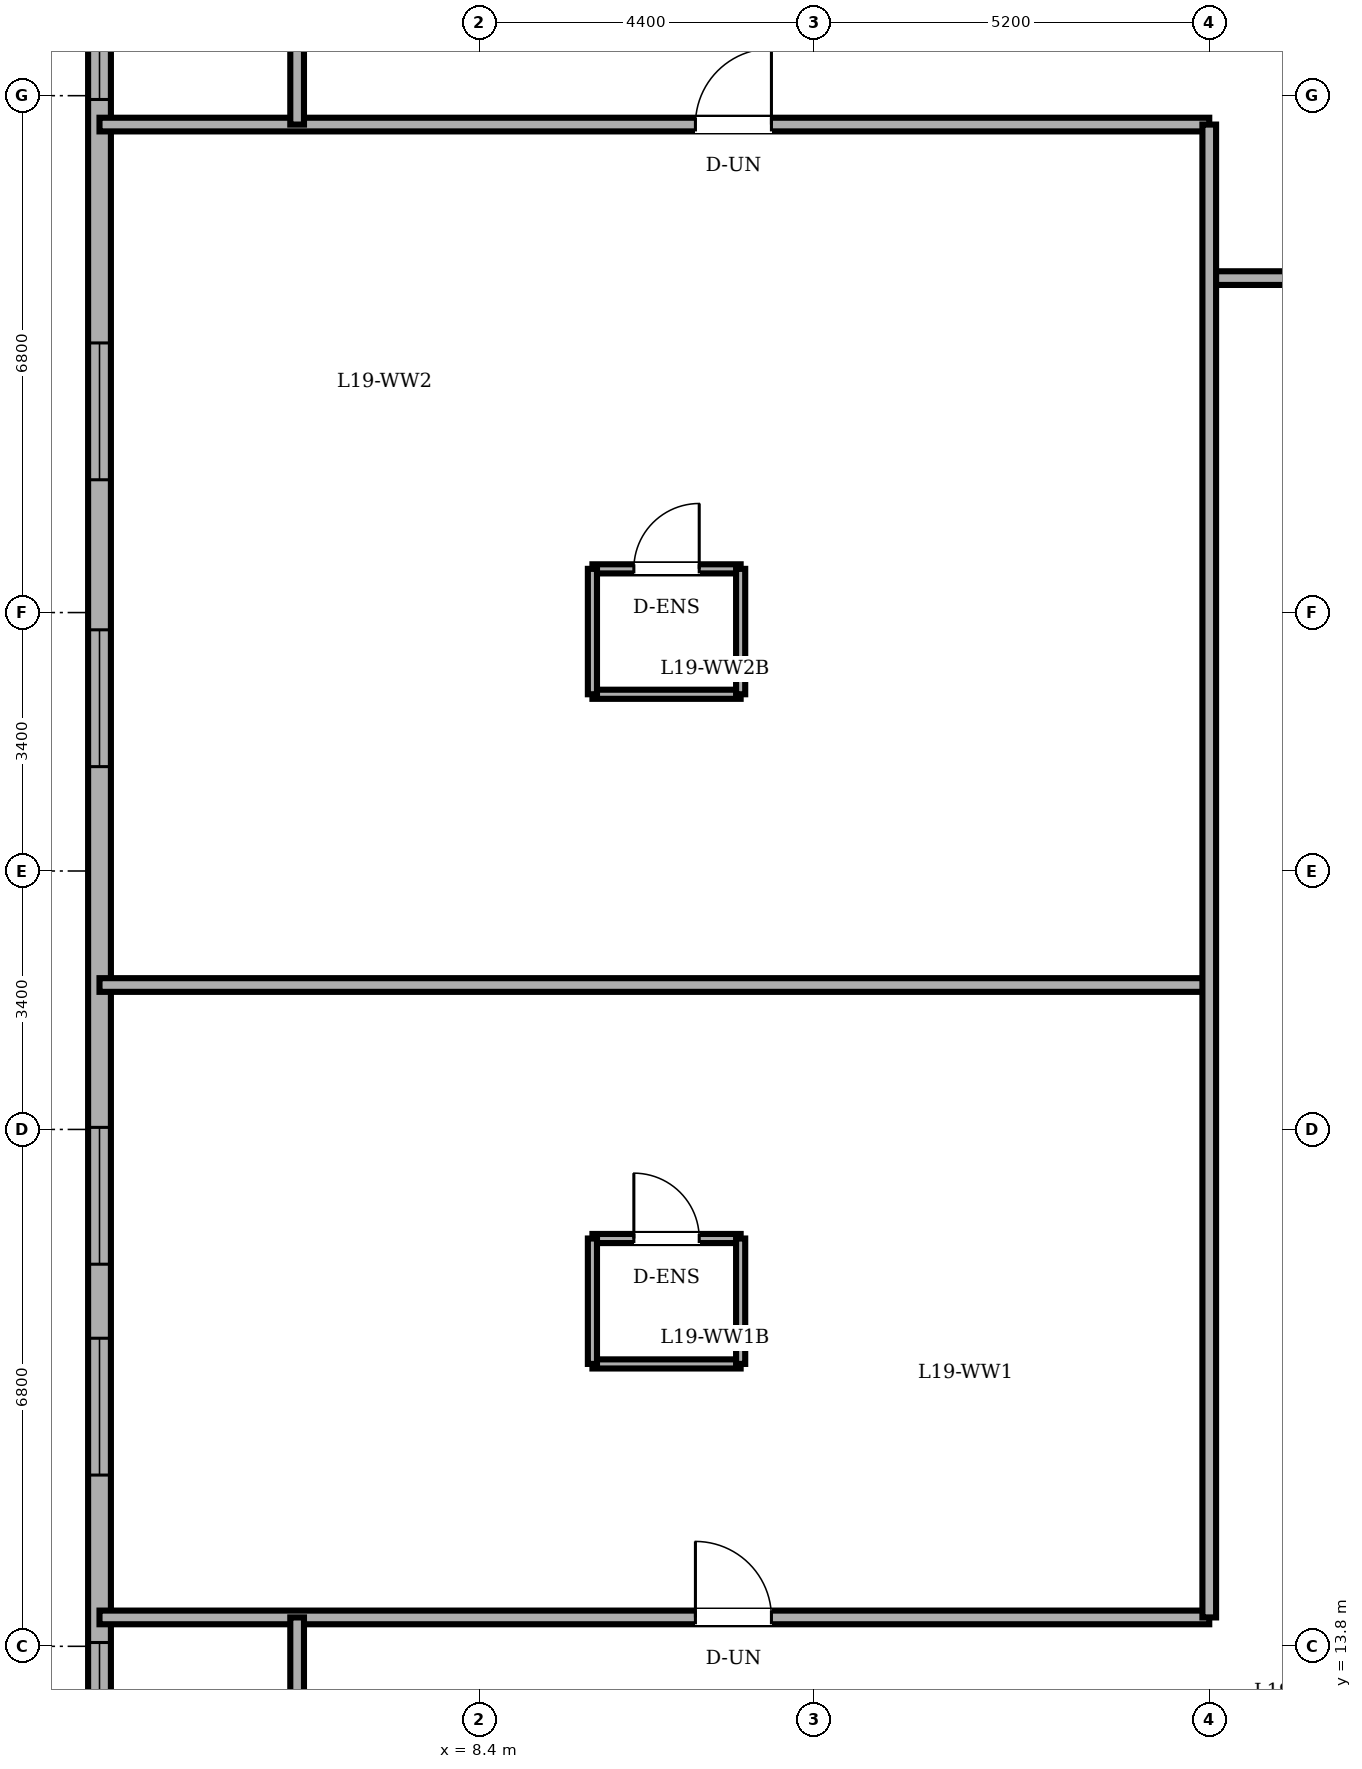
"""IFC4 building model, lengths in metres.
Left out: names, types, materials, properties, quantities, classifications, styles, units other than length and angle.
Written with IfcOpenShell. Run it as: python <this file> out.ifc"""

import sys

from ifc_helpers import new_model, si_unit, direction, frame, frame_2d, origin, place, context, subcontext, project, spatial, rectangle, extrude, element, fill, save


model = new_model("IFC4")
c1 = context("Model", 3, precision=1e-05, world=origin(), true_north=direction((0.0, 1.0)))
c2 = subcontext(c1, "Body", "Model", "MODEL_VIEW")
j1 = project(units=[si_unit("LENGTHUNIT", "METRE"), si_unit("PLANEANGLEUNIT", "RADIAN")], contexts=[c1])
p1 = place(None, origin())
s1 = spatial("IfcSite", under=j1, at=p1, CompositionType="ELEMENT")
p2 = place(p1, origin())
s2 = spatial("IfcBuilding", under=s1, at=p2, CompositionType="ELEMENT")
p3 = place(p2, frame((0.0, 0.0, 72.0)))
s3 = spatial("IfcBuildingStorey", under=s2, at=p3, CompositionType="ELEMENT", Elevation=72.0)
p4 = place(p3, frame((3.4, 40.2, 0.0), z_axis=(0.0, 0.0, 1.0), x_axis=(0.0, -1.0, 0.0)))
e1 = element("IfcWall", 1, at=p4, inside=s3, PredefinedType="SOLIDWALL", context=c2, shape_type="SweptSolid", body=[
    extrude(rectangle(XDim=32.4, YDim=0.3, at=frame_2d((16.2, 0.0))), origin(), (0.0, 0.0, 1.0), 3.36),
])
p5 = place(p4, frame((1.235, 0.0, 0.85)))
e2 = element("IfcOpeningElement", 2, at=p5, cuts=e1, PredefinedType="OPENING", context=c2, shape_type="SweptSolid", body=[
    extrude(rectangle(XDim=1.8, YDim=1.55, at=frame_2d((0.9, 0.775))), frame((0.0, 0.16, 0.0), z_axis=(0.0, -1.0, 0.0), x_axis=(1.0, 0.0, 0.0)), (0.0, 0.0, 1.0), 0.32),
])
p6 = place(p4, frame((4.25, 0.0, 0.85)))
e3 = element("IfcOpeningElement", 3, at=p6, cuts=e1, PredefinedType="OPENING", context=c2, shape_type="SweptSolid", body=[
    extrude(rectangle(XDim=1.8, YDim=1.55, at=frame_2d((0.9, 0.775))), frame((0.0, 0.16, 0.0), z_axis=(0.0, -1.0, 0.0), x_axis=(1.0, 0.0, 0.0)), (0.0, 0.0, 1.0), 0.32),
])
p7 = place(p4, frame((9.253, 0.0, 0.85)))
e4 = element("IfcOpeningElement", 4, at=p7, cuts=e1, PredefinedType="OPENING", context=c2, shape_type="SweptSolid", body=[
    extrude(rectangle(XDim=1.8, YDim=1.55, at=frame_2d((0.9, 0.775))), frame((0.0, 0.16, 0.0), z_axis=(0.0, -1.0, 0.0), x_axis=(1.0, 0.0, 0.0)), (0.0, 0.0, 1.0), 0.32),
])
p8 = place(p4, frame((13.027, 0.0, 0.85)))
e5 = element("IfcOpeningElement", 5, at=p8, cuts=e1, PredefinedType="OPENING", context=c2, shape_type="SweptSolid", body=[
    extrude(rectangle(XDim=1.8, YDim=1.55, at=frame_2d((0.9, 0.775))), frame((0.0, 0.16, 0.0), z_axis=(0.0, -1.0, 0.0), x_axis=(1.0, 0.0, 0.0)), (0.0, 0.0, 1.0), 0.32),
])
p9 = place(p4, frame((19.573, 0.0, 0.85)))
e6 = element("IfcOpeningElement", 6, at=p9, cuts=e1, PredefinedType="OPENING", context=c2, shape_type="SweptSolid", body=[
    extrude(rectangle(XDim=1.8, YDim=1.55, at=frame_2d((0.9, 0.775))), frame((0.0, 0.16, 0.0), z_axis=(0.0, -1.0, 0.0), x_axis=(1.0, 0.0, 0.0)), (0.0, 0.0, 1.0), 0.32),
])
p10 = place(p4, frame((22.347, 0.0, 0.85)))
e7 = element("IfcOpeningElement", 7, at=p10, cuts=e1, PredefinedType="OPENING", context=c2, shape_type="SweptSolid", body=[
    extrude(rectangle(XDim=1.8, YDim=1.55, at=frame_2d((0.9, 0.775))), frame((0.0, 0.16, 0.0), z_axis=(0.0, -1.0, 0.0), x_axis=(1.0, 0.0, 0.0)), (0.0, 0.0, 1.0), 0.32),
])
p11 = place(p4, frame((26.35, 0.0, 0.85)))
e8 = element("IfcOpeningElement", 8, at=p11, cuts=e1, PredefinedType="OPENING", context=c2, shape_type="SweptSolid", body=[
    extrude(rectangle(XDim=1.8, YDim=1.55, at=frame_2d((0.9, 0.775))), frame((0.0, 0.16, 0.0), z_axis=(0.0, -1.0, 0.0), x_axis=(1.0, 0.0, 0.0)), (0.0, 0.0, 1.0), 0.32),
])
p12 = place(p4, frame((29.365, 0.0, 0.85)))
e9 = element("IfcOpeningElement", 9, at=p12, cuts=e1, PredefinedType="OPENING", context=c2, shape_type="SweptSolid", body=[
    extrude(rectangle(XDim=1.8, YDim=1.55, at=frame_2d((0.9, 0.775))), frame((0.0, 0.16, 0.0), z_axis=(0.0, -1.0, 0.0), x_axis=(1.0, 0.0, 0.0)), (0.0, 0.0, 1.0), 0.32),
])
p13 = place(p3, frame((9.885, 19.165, 0.0), z_axis=(0.0, 0.0, 1.0), x_axis=(1.0, 0.0, 0.0)))
e10 = element("IfcWall", 10, at=p13, inside=s3, PredefinedType="PARTITIONING", context=c2, shape_type="SweptSolid", body=[
    extrude(rectangle(XDim=1.95, YDim=0.12, at=frame_2d((0.975, 0.0))), origin(), (0.0, 0.0, 1.0), 3.36),
])
p14 = place(p13, frame((0.545, 0.0, 0.0)))
e11 = element("IfcOpeningElement", 11, at=p14, cuts=e10, PredefinedType="OPENING", context=c2, shape_type="SweptSolid", body=[
    extrude(rectangle(XDim=0.86, YDim=2.1, at=frame_2d((0.43, 1.05))), frame((0.0, 0.07, 0.0), z_axis=(0.0, -1.0, 0.0), x_axis=(1.0, 0.0, 0.0)), (0.0, 0.0, 1.0), 0.14),
])
p15 = place(p3, frame((11.835, 17.515, 0.0), z_axis=(0.0, 0.0, 1.0), x_axis=(-1.0, 0.0, 0.0)))
e12 = element("IfcWall", 12, at=p15, inside=s3, PredefinedType="PARTITIONING", context=c2, shape_type="SweptSolid", body=[
    extrude(rectangle(XDim=1.95, YDim=0.12, at=frame_2d((0.975, 0.0))), origin(), (0.0, 0.0, 1.0), 3.36),
])
for number, where, z_axis, x_axis in (
    (13, (9.885, 19.165, 0.0), (0.0, 0.0, 1.0), (0.0, -1.0, 0.0)),
    (14, (11.835, 17.515, 0.0), (0.0, 0.0, 1.0), (0.0, 1.0, 0.0)),
):
    element("IfcWall", number, at=place(p3, frame(where, z_axis=z_axis, x_axis=x_axis)), inside=s3, PredefinedType="PARTITIONING", context=c2, shape_type="SweptSolid", body=[
        extrude(rectangle(XDim=1.65, YDim=0.12, at=frame_2d((0.825, 0.0))), origin(), (0.0, 0.0, 1.0), 3.36),
    ])
p16 = place(p3, frame((9.885, 27.975, 0.0), z_axis=(0.0, 0.0, 1.0), x_axis=(1.0, 0.0, 0.0)))
e15 = element("IfcWall", 15, at=p16, inside=s3, PredefinedType="PARTITIONING", context=c2, shape_type="SweptSolid", body=[
    extrude(rectangle(XDim=1.95, YDim=0.12, at=frame_2d((0.975, 0.0))), origin(), (0.0, 0.0, 1.0), 3.36),
])
p17 = place(p16, frame((0.545, 0.0, 0.0)))
e16 = element("IfcOpeningElement", 16, at=p17, cuts=e15, PredefinedType="OPENING", context=c2, shape_type="SweptSolid", body=[
    extrude(rectangle(XDim=0.86, YDim=2.1, at=frame_2d((0.43, 1.05))), frame((0.0, 0.07, 0.0), z_axis=(0.0, -1.0, 0.0), x_axis=(1.0, 0.0, 0.0)), (0.0, 0.0, 1.0), 0.14),
])
p18 = place(p3, frame((11.835, 26.325, 0.0), z_axis=(0.0, 0.0, 1.0), x_axis=(-1.0, 0.0, 0.0)))
e17 = element("IfcWall", 17, at=p18, inside=s3, PredefinedType="PARTITIONING", context=c2, shape_type="SweptSolid", body=[
    extrude(rectangle(XDim=1.95, YDim=0.12, at=frame_2d((0.975, 0.0))), origin(), (0.0, 0.0, 1.0), 3.36),
])
for number, where, z_axis, x_axis in (
    (18, (9.885, 27.975, 0.0), (0.0, 0.0, 1.0), (0.0, -1.0, 0.0)),
    (19, (11.835, 26.325, 0.0), (0.0, 0.0, 1.0), (0.0, 1.0, 0.0)),
):
    element("IfcWall", number, at=place(p3, frame(where, z_axis=z_axis, x_axis=x_axis)), inside=s3, PredefinedType="PARTITIONING", context=c2, shape_type="SweptSolid", body=[
        extrude(rectangle(XDim=1.65, YDim=0.12, at=frame_2d((0.825, 0.0))), origin(), (0.0, 0.0, 1.0), 3.36),
    ])
p19 = place(p3, frame((3.4, 14.18, 0.0), z_axis=(0.0, 0.0, 1.0), x_axis=(1.0, 0.0, 0.0)))
e20 = element("IfcWall", 20, at=p19, inside=s3, PredefinedType="PARTITIONING", context=c2, shape_type="SweptSolid", body=[
    extrude(rectangle(XDim=14.6, YDim=0.18, at=frame_2d((7.3, 0.0))), origin(), (0.0, 0.0, 1.0), 3.36),
])
p20 = place(p19, frame((7.84, 0.0, 0.0)))
e21 = element("IfcOpeningElement", 21, at=p20, cuts=e20, PredefinedType="OPENING", context=c2, shape_type="SweptSolid", body=[
    extrude(rectangle(XDim=1.0, YDim=2.15, at=frame_2d((0.5, 1.075))), frame((0.0, 0.1, 0.0), z_axis=(0.0, -1.0, 0.0), x_axis=(1.0, 0.0, 0.0)), (0.0, 0.0, 1.0), 0.2),
])
p21 = place(p3, frame((3.4, 22.5, 0.0), z_axis=(0.0, 0.0, 1.0), x_axis=(1.0, 0.0, 0.0)))
e22 = element("IfcWall", 22, at=p21, inside=s3, PredefinedType="PARTITIONING", context=c2, shape_type="SweptSolid", body=[
    extrude(rectangle(XDim=14.6, YDim=0.18, at=frame_2d((7.3, 0.0))), origin(), (0.0, 0.0, 1.0), 3.36),
])
p22 = place(p3, frame((18.0, 31.8, 0.0), z_axis=(0.0, 0.0, 1.0), x_axis=(1.0, 0.0, 0.0)))
e23 = element("IfcWall", 23, at=p22, inside=s3, PredefinedType="PARTITIONING", context=c2, shape_type="SweptSolid", body=[
    extrude(rectangle(XDim=2.35, YDim=0.18, at=frame_2d((1.175, 0.0))), origin(), (0.0, 0.0, 1.0), 3.36),
])
p23 = place(p3, frame((3.4, 33.82, 0.0), z_axis=(0.0, 0.0, 1.0), x_axis=(1.0, 0.0, 0.0)))
e24 = element("IfcWall", 24, at=p23, inside=s3, PredefinedType="PARTITIONING", context=c2, shape_type="SweptSolid", body=[
    extrude(rectangle(XDim=14.6, YDim=0.18, at=frame_2d((7.3, 0.0))), origin(), (0.0, 0.0, 1.0), 3.36),
])
p24 = place(p23, frame((7.84, 0.0, 0.0)))
e25 = element("IfcOpeningElement", 25, at=p24, cuts=e24, PredefinedType="OPENING", context=c2, shape_type="SweptSolid", body=[
    extrude(rectangle(XDim=1.0, YDim=2.15, at=frame_2d((0.5, 1.075))), frame((0.0, 0.1, 0.0), z_axis=(0.0, -1.0, 0.0), x_axis=(1.0, 0.0, 0.0)), (0.0, 0.0, 1.0), 0.2),
])
for number, where, z_axis, x_axis in (
    (26, (6.0, 11.72, 0.0), (0.0, 0.0, 1.0), (0.0, 1.0, 0.0)),
    (27, (6.0, 33.82, 0.0), (0.0, 0.0, 1.0), (0.0, 1.0, 0.0)),
):
    element("IfcWall", number, at=place(p3, frame(where, z_axis=z_axis, x_axis=x_axis)), inside=s3, PredefinedType="PARTITIONING", context=c2, shape_type="SweptSolid", body=[
        extrude(rectangle(XDim=2.46, YDim=0.18, at=frame_2d((1.23, 0.0))), origin(), (0.0, 0.0, 1.0), 3.36),
    ])
p25 = place(p3, frame((18.0, 14.18, 0.0), z_axis=(0.0, 0.0, 1.0), x_axis=(0.0, 1.0, 0.0)))
e28 = element("IfcWall", 28, at=p25, inside=s3, PredefinedType="PARTITIONING", context=c2, shape_type="SweptSolid", body=[
    extrude(rectangle(XDim=19.64, YDim=0.18, at=frame_2d((9.82, 0.0))), origin(), (0.0, 0.0, 1.0), 3.36),
])
p26 = place(p6, origin())
e29 = element("IfcWindow", 29, at=p26, inside=s3, PartitioningType="DOUBLE_PANEL_VERTICAL", PredefinedType="WINDOW", context=c2, shape_type="SweptSolid", body=[
    extrude(rectangle(XDim=1.8, YDim=1.55, at=frame_2d((0.9, 0.775))), frame((0.0, 0.03, 0.0), z_axis=(0.0, -1.0, 0.0), x_axis=(1.0, 0.0, 0.0)), (0.0, 0.0, 1.0), 0.06),
])
fill(e3, e29)
p27 = place(p7, origin())
e30 = element("IfcWindow", 30, at=p27, inside=s3, PartitioningType="DOUBLE_PANEL_VERTICAL", PredefinedType="WINDOW", context=c2, shape_type="SweptSolid", body=[
    extrude(rectangle(XDim=1.8, YDim=1.55, at=frame_2d((0.9, 0.775))), frame((0.0, 0.03, 0.0), z_axis=(0.0, -1.0, 0.0), x_axis=(1.0, 0.0, 0.0)), (0.0, 0.0, 1.0), 0.06),
])
fill(e4, e30)
p28 = place(p8, origin())
e31 = element("IfcWindow", 31, at=p28, inside=s3, PartitioningType="DOUBLE_PANEL_VERTICAL", PredefinedType="WINDOW", context=c2, shape_type="SweptSolid", body=[
    extrude(rectangle(XDim=1.8, YDim=1.55, at=frame_2d((0.9, 0.775))), frame((0.0, 0.03, 0.0), z_axis=(0.0, -1.0, 0.0), x_axis=(1.0, 0.0, 0.0)), (0.0, 0.0, 1.0), 0.06),
])
fill(e5, e31)
p29 = place(p9, origin())
e32 = element("IfcWindow", 32, at=p29, inside=s3, PartitioningType="DOUBLE_PANEL_VERTICAL", PredefinedType="WINDOW", context=c2, shape_type="SweptSolid", body=[
    extrude(rectangle(XDim=1.8, YDim=1.55, at=frame_2d((0.9, 0.775))), frame((0.0, 0.03, 0.0), z_axis=(0.0, -1.0, 0.0), x_axis=(1.0, 0.0, 0.0)), (0.0, 0.0, 1.0), 0.06),
])
fill(e6, e32)
p30 = place(p10, origin())
e33 = element("IfcWindow", 33, at=p30, inside=s3, PartitioningType="DOUBLE_PANEL_VERTICAL", PredefinedType="WINDOW", context=c2, shape_type="SweptSolid", body=[
    extrude(rectangle(XDim=1.8, YDim=1.55, at=frame_2d((0.9, 0.775))), frame((0.0, 0.03, 0.0), z_axis=(0.0, -1.0, 0.0), x_axis=(1.0, 0.0, 0.0)), (0.0, 0.0, 1.0), 0.06),
])
fill(e7, e33)
p31 = place(p11, origin())
e34 = element("IfcWindow", 34, at=p31, inside=s3, PartitioningType="DOUBLE_PANEL_VERTICAL", PredefinedType="WINDOW", context=c2, shape_type="SweptSolid", body=[
    extrude(rectangle(XDim=1.8, YDim=1.55, at=frame_2d((0.9, 0.775))), frame((0.0, 0.03, 0.0), z_axis=(0.0, -1.0, 0.0), x_axis=(1.0, 0.0, 0.0)), (0.0, 0.0, 1.0), 0.06),
])
fill(e8, e34)
p32 = place(p14, origin())
e35 = element("IfcDoor", 35, at=p32, inside=s3, OperationType="SINGLE_SWING_LEFT", PredefinedType="DOOR", context=c2, shape_type="SweptSolid", body=[
    extrude(rectangle(XDim=0.86, YDim=2.1, at=frame_2d((0.43, 1.05))), frame((0.0, 0.025, 0.0), z_axis=(0.0, -1.0, 0.0), x_axis=(1.0, 0.0, 0.0)), (0.0, 0.0, 1.0), 0.05),
])
fill(e11, e35)
p33 = place(p17, origin())
e36 = element("IfcDoor", 36, at=p33, inside=s3, OperationType="SINGLE_SWING_RIGHT", PredefinedType="DOOR", context=c2, shape_type="SweptSolid", body=[
    extrude(rectangle(XDim=0.86, YDim=2.1, at=frame_2d((0.43, 1.05))), frame((0.0, 0.025, 0.0), z_axis=(0.0, -1.0, 0.0), x_axis=(1.0, 0.0, 0.0)), (0.0, 0.0, 1.0), 0.05),
])
fill(e16, e36)
p34 = place(p20, origin())
e37 = element("IfcDoor", 37, at=p34, inside=s3, OperationType="SINGLE_SWING_LEFT", PredefinedType="DOOR", context=c2, shape_type="SweptSolid", body=[
    extrude(rectangle(XDim=1.0, YDim=2.15, at=frame_2d((0.5, 1.075))), frame((0.0, 0.025, 0.0), z_axis=(0.0, -1.0, 0.0), x_axis=(1.0, 0.0, 0.0)), (0.0, 0.0, 1.0), 0.05),
])
fill(e21, e37)
p35 = place(p24, origin())
e38 = element("IfcDoor", 38, at=p35, inside=s3, OperationType="SINGLE_SWING_RIGHT", PredefinedType="DOOR", context=c2, shape_type="SweptSolid", body=[
    extrude(rectangle(XDim=1.0, YDim=2.15, at=frame_2d((0.5, 1.075))), frame((0.0, 0.025, 0.0), z_axis=(0.0, -1.0, 0.0), x_axis=(1.0, 0.0, 0.0)), (0.0, 0.0, 1.0), 0.05),
])
fill(e25, e38)
save(model, sys.argv[1])
